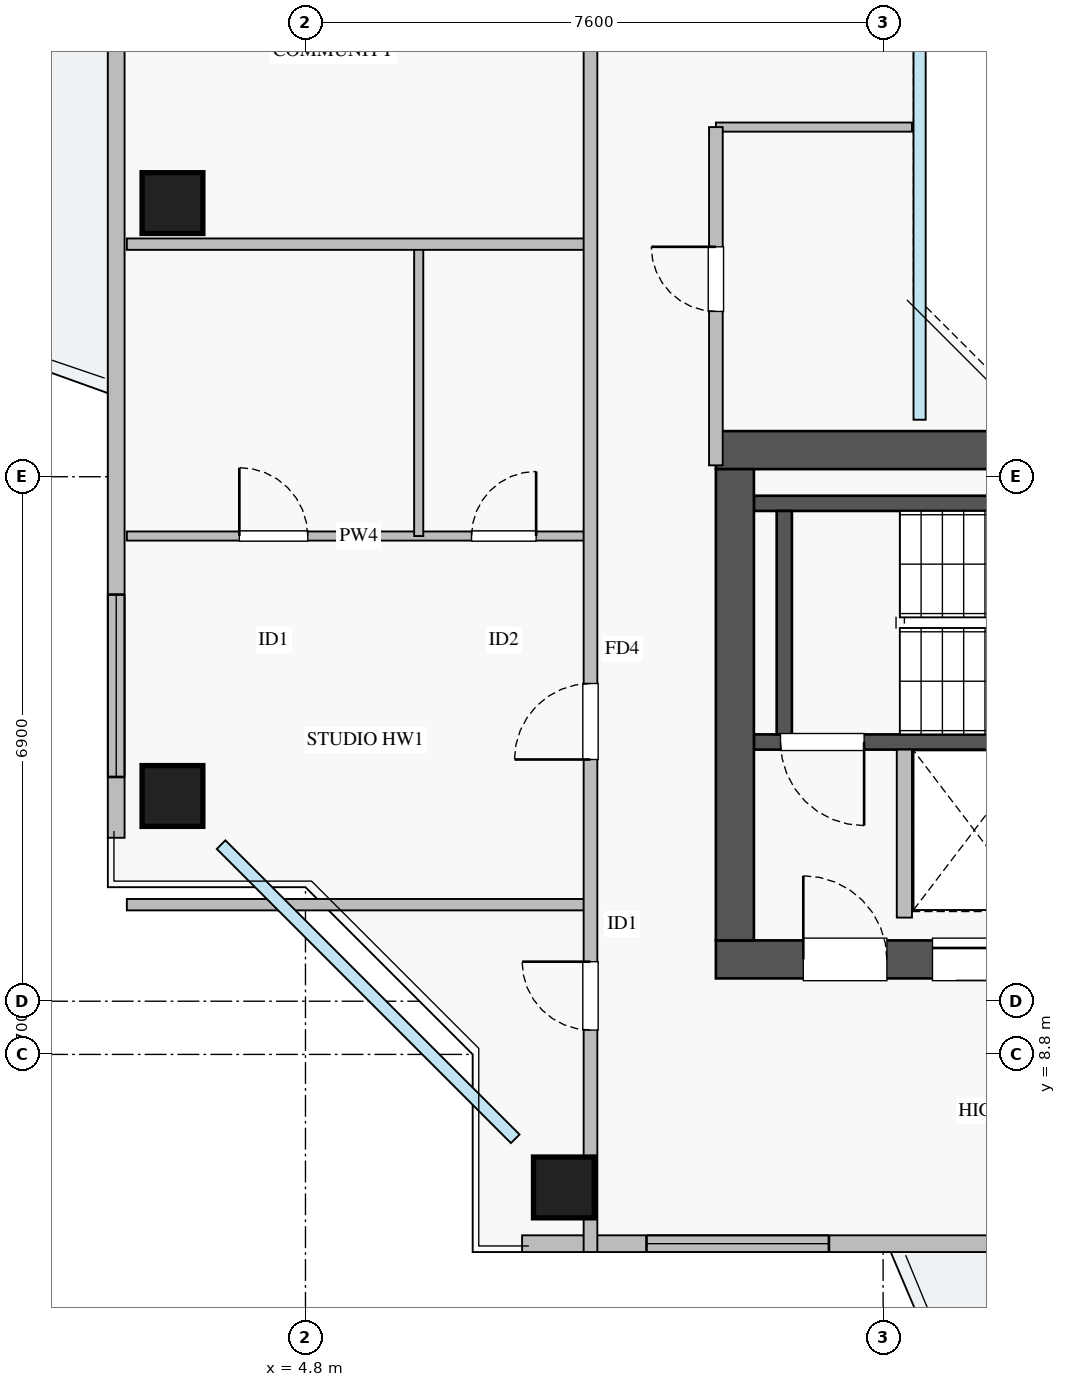
"""IFC4 building model, lengths in metres.
Left out: names, types, materials, properties, quantities, classifications, styles, units other than length and angle.
Written with IfcOpenShell. Run it as: python <this file> out.ifc"""

import sys

from ifc_helpers import new_model, si_unit, direction, frame, frame_2d, origin, origin_2d, place, context, subcontext, project, spatial, rectangle, extrude, source, transform, mapped, element, fill, save


model = new_model("IFC4")
c1 = context("Model", 3, precision=1e-05, world=origin(), true_north=direction((0.0, 1.0)))
c2 = subcontext(c1, "Body", "Model", "MODEL_VIEW")
j1 = project(units=[si_unit("LENGTHUNIT", "METRE"), si_unit("PLANEANGLEUNIT", "RADIAN")], contexts=[c1])
p1 = place(None, origin())
s1 = spatial("IfcSite", under=j1, at=p1, CompositionType="ELEMENT")
p2 = place(p1, origin())
s2 = spatial("IfcBuilding", under=s1, at=p2, CompositionType="ELEMENT")
p3 = place(p2, frame((0.0, 0.0, 206.75)))
s3 = spatial("IfcBuildingStorey", under=s2, at=p3, CompositionType="ELEMENT", Elevation=206.75)
p4 = place(p3, frame((12.68, 12.8, 0.0), z_axis=(0.0, 0.0, 1.0), x_axis=(1.0, 0.0, 0.0)))
e1 = element("IfcWall", 1, at=p4, inside=s3, PredefinedType="SHEAR", context=c2, shape_type="SweptSolid", body=[
    extrude(rectangle(XDim=1.94, YDim=0.18, at=frame_2d((0.97, 0.0))), origin(), (0.0, 0.0, 1.0), 3.07),
])
p5 = place(p3, frame((10.7, 12.91, 0.0), z_axis=(0.0, 0.0, 1.0), x_axis=(1.0, 0.0, 0.0)))
e2 = element("IfcWall", 2, at=p5, inside=s3, PredefinedType="SHEAR", context=c2, shape_type="SweptSolid", body=[
    extrude(rectangle(XDim=7.45, YDim=0.2, at=frame_2d((3.725, 0.0))), origin(), (0.0, 0.0, 1.0), 3.25),
])
p6 = place(p5, frame((0.35, 0.0, 0.0)))
e3 = element("IfcOpeningElement", 3, at=p6, cuts=e2, PredefinedType="OPENING", context=c2, shape_type="SweptSolid", body=[
    extrude(rectangle(XDim=1.1, YDim=2.05, at=frame_2d((0.55, 1.025))), frame((0.0, 0.11, 0.0), z_axis=(0.0, -1.0, 0.0), x_axis=(1.0, 0.0, 0.0)), (0.0, 0.0, 1.0), 0.22),
])
p7 = place(p3, frame((10.7, 16.05, 0.0), z_axis=(0.0, 0.0, 1.0), x_axis=(1.0, 0.0, 0.0)))
e4 = element("IfcWall", 4, at=p7, inside=s3, PredefinedType="SHEAR", context=c2, shape_type="SweptSolid", body=[
    extrude(rectangle(XDim=7.45, YDim=0.2, at=frame_2d((3.725, 0.0))), origin(), (0.0, 0.0, 1.0), 3.25),
])
p8 = place(p3, frame((11.1, 13.01, 0.0), z_axis=(0.0, 0.0, 1.0), x_axis=(0.0, 1.0, 0.0)))
e5 = element("IfcWall", 5, at=p8, inside=s3, PredefinedType="SHEAR", context=c2, shape_type="SweptSolid", body=[
    extrude(rectangle(XDim=2.94, YDim=0.2, at=frame_2d((1.47, 0.0))), origin(), (0.0, 0.0, 1.0), 3.25),
])
p9 = place(p3, frame((10.2, 10.05, 0.0), z_axis=(0.0, 0.0, 1.0), x_axis=(1.0, 0.0, 0.0)))
e6 = element("IfcWall", 6, at=p9, inside=s3, PredefinedType="SHEAR", context=c2, shape_type="SweptSolid", body=[
    extrude(rectangle(XDim=17.6, YDim=0.5, at=frame_2d((8.8, 0.0))), origin(), (0.0, 0.0, 1.0), 3.25),
])
p10 = place(p9, frame((1.15, 0.0, 0.0)))
e7 = element("IfcOpeningElement", 7, at=p10, cuts=e6, PredefinedType="OPENING", context=c2, shape_type="SweptSolid", body=[
    extrude(rectangle(XDim=1.1, YDim=2.05, at=frame_2d((0.55, 1.025))), frame((0.0, 0.26, 0.0), z_axis=(0.0, -1.0, 0.0), x_axis=(1.0, 0.0, 0.0)), (0.0, 0.0, 1.0), 0.52),
])
p11 = place(p9, frame((8.3, 0.0, 0.0)))
e8 = element("IfcOpeningElement", 8, at=p11, cuts=e6, PredefinedType="OPENING", context=c2, shape_type="SweptSolid", body=[
    extrude(rectangle(XDim=1.1, YDim=2.05, at=frame_2d((0.55, 1.025))), frame((0.0, 0.26, 0.0), z_axis=(0.0, -1.0, 0.0), x_axis=(1.0, 0.0, 0.0)), (0.0, 0.0, 1.0), 0.52),
])
p12 = place(p9, frame((2.85, 0.0, 0.0)))
e9 = element("IfcOpeningElement", 9, at=p12, cuts=e6, PredefinedType="OPENING", context=c2, shape_type="SweptSolid", body=[
    extrude(rectangle(XDim=1.1, YDim=2.05, at=frame_2d((0.55, 1.025))), frame((0.0, 0.26, 0.0), z_axis=(0.0, -1.0, 0.0), x_axis=(1.0, 0.0, 0.0)), (0.0, 0.0, 1.0), 0.52),
])
p13 = place(p9, frame((5.8, 0.0, 0.0)))
e10 = element("IfcOpeningElement", 10, at=p13, cuts=e6, PredefinedType="OPENING", context=c2, shape_type="SweptSolid", body=[
    extrude(rectangle(XDim=1.0, YDim=2.05, at=frame_2d((0.5, 1.025))), frame((0.0, 0.26, 0.0), z_axis=(0.0, -1.0, 0.0), x_axis=(1.0, 0.0, 0.0)), (0.0, 0.0, 1.0), 0.52),
])
p14 = place(p9, frame((14.74, 0.0, 0.0)))
e11 = element("IfcOpeningElement", 11, at=p14, cuts=e6, PredefinedType="OPENING", context=c2, shape_type="SweptSolid", body=[
    extrude(rectangle(XDim=1.0, YDim=2.05, at=frame_2d((0.5, 1.025))), frame((0.0, 0.26, 0.0), z_axis=(0.0, -1.0, 0.0), x_axis=(1.0, 0.0, 0.0)), (0.0, 0.0, 1.0), 0.52),
])
p15 = place(p9, frame((11.67, 0.0, 0.0)))
e12 = element("IfcOpeningElement", 12, at=p15, cuts=e6, PredefinedType="OPENING", context=c2, shape_type="SweptSolid", body=[
    extrude(rectangle(XDim=1.0, YDim=2.05, at=frame_2d((0.5, 1.025))), frame((0.0, 0.26, 0.0), z_axis=(0.0, -1.0, 0.0), x_axis=(1.0, 0.0, 0.0)), (0.0, 0.0, 1.0), 0.52),
])
p16 = place(p3, frame((10.2, 16.75, 0.0), z_axis=(0.0, 0.0, 1.0), x_axis=(1.0, 0.0, 0.0)))
e13 = element("IfcWall", 13, at=p16, inside=s3, PredefinedType="SHEAR", context=c2, shape_type="SweptSolid", body=[
    extrude(rectangle(XDim=17.6, YDim=0.5, at=frame_2d((8.8, 0.0))), origin(), (0.0, 0.0, 1.0), 3.25),
])
p17 = place(p3, frame((10.45, 10.3, 0.0), z_axis=(0.0, 0.0, 1.0), x_axis=(0.0, 1.0, 0.0)))
e14 = element("IfcWall", 14, at=p17, inside=s3, PredefinedType="SHEAR", context=c2, shape_type="SweptSolid", body=[
    extrude(rectangle(XDim=6.2, YDim=0.5, at=frame_2d((3.1, 0.0))), origin(), (0.0, 0.0, 1.0), 3.25),
])
m1 = source(origin(), c2, "Body", "SweptSolid", [
    extrude(rectangle(XDim=0.8, YDim=0.8, at=origin_2d()), origin(), (0.0, 0.0, 1.0), 3.25),
])
for number, where, z_axis, x_axis in (
    (15, (8.2, 7.05, 0.0), (0.0, 0.0, 1.0), (1.0, 0.0, 0.0)),
    (16, (3.05, 20.0, 0.0), (0.0, 0.0, 1.0), (1.0, 0.0, 0.0)),
    (17, (3.05, 12.2, 0.0), (0.0, 0.0, 1.0), (1.0, 0.0, 0.0)),
):
    element("IfcColumn", number, at=place(p3, frame(where, z_axis=z_axis, x_axis=x_axis)), inside=s3, PredefinedType="COLUMN", context=c2, shape_type="MappedRepresentation", body=[
        mapped(m1, transform((0.0, 0.0, 0.0), x_axis=(1.0, 0.0, 0.0), y_axis=(0.0, 1.0, 0.0), z_axis=(0.0, 0.0, 1.0), scale=1.0)),
    ])
p18 = place(p3, frame((7.65, 6.31, 0.0), z_axis=(0.0, 0.0, 1.0), x_axis=(1.0, 0.0, 0.0)))
e18 = element("IfcWall", 18, at=p18, inside=s3, PredefinedType="STANDARD", context=c2, shape_type="SweptSolid", body=[
    extrude(rectangle(XDim=22.7, YDim=0.22, at=frame_2d((11.35, 0.0))), origin(), (0.0, 0.0, 1.0), 2.61),
])
p19 = place(p18, frame((12.2, 0.0, 0.0)))
e19 = element("IfcOpeningElement", 19, at=p19, cuts=e18, PredefinedType="OPENING", context=c2, shape_type="SweptSolid", body=[
    extrude(rectangle(XDim=1.2, YDim=2.1, at=frame_2d((0.6, 1.05))), frame((0.0, 0.12, 0.0), z_axis=(0.0, -1.0, 0.0), x_axis=(1.0, 0.0, 0.0)), (0.0, 0.0, 1.0), 0.24),
])
p20 = place(p18, frame((1.637, 0.0, 0.9)))
e20 = element("IfcOpeningElement", 20, at=p20, cuts=e18, PredefinedType="OPENING", context=c2, shape_type="SweptSolid", body=[
    extrude(rectangle(XDim=2.4, YDim=1.48, at=frame_2d((1.2, 0.74))), frame((0.0, 0.12, 0.0), z_axis=(0.0, -1.0, 0.0), x_axis=(1.0, 0.0, 0.0)), (0.0, 0.0, 1.0), 0.24),
])
p21 = place(p18, frame((7.612, 0.0, 0.9)))
e21 = element("IfcOpeningElement", 21, at=p21, cuts=e18, PredefinedType="OPENING", context=c2, shape_type="SweptSolid", body=[
    extrude(rectangle(XDim=1.8, YDim=1.45, at=frame_2d((0.9, 0.725))), frame((0.0, 0.12, 0.0), z_axis=(0.0, -1.0, 0.0), x_axis=(1.0, 0.0, 0.0)), (0.0, 0.0, 1.0), 0.24),
])
p22 = place(p18, frame((19.788, 0.0, 0.9)))
e22 = element("IfcOpeningElement", 22, at=p22, cuts=e18, PredefinedType="OPENING", context=c2, shape_type="SweptSolid", body=[
    extrude(rectangle(XDim=2.1, YDim=1.5, at=frame_2d((1.05, 0.75))), frame((0.0, 0.12, 0.0), z_axis=(0.0, -1.0, 0.0), x_axis=(1.0, 0.0, 0.0)), (0.0, 0.0, 1.0), 0.24),
])
p23 = place(p3, frame((2.31, 11.65, 0.0), z_axis=(0.0, 0.0, 1.0), x_axis=(0.0, 1.0, 0.0)))
e23 = element("IfcWall", 23, at=p23, inside=s3, PredefinedType="STANDARD", context=c2, shape_type="SweptSolid", body=[
    extrude(rectangle(XDim=22.7, YDim=0.22, at=frame_2d((11.35, 0.0))), origin(), (0.0, 0.0, 1.0), 2.61),
])
p24 = place(p23, frame((12.2, 0.0, 0.0)))
e24 = element("IfcOpeningElement", 24, at=p24, cuts=e23, PredefinedType="OPENING", context=c2, shape_type="SweptSolid", body=[
    extrude(rectangle(XDim=1.2, YDim=2.1, at=frame_2d((0.6, 1.05))), frame((0.0, 0.12, 0.0), z_axis=(0.0, -1.0, 0.0), x_axis=(1.0, 0.0, 0.0)), (0.0, 0.0, 1.0), 0.24),
])
p25 = place(p23, frame((0.8, 0.0, 0.9)))
e25 = element("IfcOpeningElement", 25, at=p25, cuts=e23, PredefinedType="OPENING", context=c2, shape_type="SweptSolid", body=[
    extrude(rectangle(XDim=2.4, YDim=1.5, at=frame_2d((1.2, 0.75))), frame((0.0, 0.12, 0.0), z_axis=(0.0, -1.0, 0.0), x_axis=(1.0, 0.0, 0.0)), (0.0, 0.0, 1.0), 0.24),
])
p26 = place(p23, frame((20.08, 0.0, 0.9)))
e26 = element("IfcOpeningElement", 26, at=p26, cuts=e23, PredefinedType="OPENING", context=c2, shape_type="SweptSolid", body=[
    extrude(rectangle(XDim=2.1, YDim=1.5, at=frame_2d((1.05, 0.75))), frame((0.0, 0.12, 0.0), z_axis=(0.0, -1.0, 0.0), x_axis=(1.0, 0.0, 0.0)), (0.0, 0.0, 1.0), 0.24),
])
p27 = place(p23, frame((16.258, 0.0, 0.9)))
e27 = element("IfcOpeningElement", 27, at=p27, cuts=e23, PredefinedType="OPENING", context=c2, shape_type="SweptSolid", body=[
    extrude(rectangle(XDim=2.4, YDim=1.5, at=frame_2d((1.2, 0.75))), frame((0.0, 0.12, 0.0), z_axis=(0.0, -1.0, 0.0), x_axis=(1.0, 0.0, 0.0)), (0.0, 0.0, 1.0), 0.24),
])
p28 = place(p3, frame((12.68, 10.6, 0.0), z_axis=(0.0, 0.0, 1.0), x_axis=(0.0, 1.0, 0.0)))
e28 = element("IfcWall", 28, at=p28, inside=s3, PredefinedType="PARTITIONING", context=c2, shape_type="SweptSolid", body=[
    extrude(rectangle(XDim=2.21, YDim=0.2, at=frame_2d((1.105, 0.0))), origin(), (0.0, 0.0, 1.0), 3.07),
])
p29 = place(p3, frame((2.45, 10.77, 0.0), z_axis=(0.0, 0.0, 1.0), x_axis=(1.0, 0.0, 0.0)))
e29 = element("IfcWall", 29, at=p29, inside=s3, PredefinedType="PARTITIONING", context=c2, shape_type="SweptSolid", body=[
    extrude(rectangle(XDim=6.1, YDim=0.15, at=frame_2d((3.05, 0.0))), origin(), (0.0, 0.0, 1.0), 3.07),
])
p30 = place(p3, frame((2.45, 15.62, 0.0), z_axis=(0.0, 0.0, 1.0), x_axis=(1.0, 0.0, 0.0)))
e30 = element("IfcWall", 30, at=p30, inside=s3, PredefinedType="PLUMBINGWALL", context=c2, shape_type="SweptSolid", body=[
    extrude(rectangle(XDim=6.1, YDim=0.12, at=frame_2d((3.05, 0.0))), origin(), (0.0, 0.0, 1.0), 3.07),
])
p31 = place(p30, frame((1.48, 0.0, 0.0)))
e31 = element("IfcOpeningElement", 31, at=p31, cuts=e30, PredefinedType="OPENING", context=c2, shape_type="SweptSolid", body=[
    extrude(rectangle(XDim=0.9, YDim=2.05, at=frame_2d((0.45, 1.025))), frame((0.0, 0.07, 0.0), z_axis=(0.0, -1.0, 0.0), x_axis=(1.0, 0.0, 0.0)), (0.0, 0.0, 1.0), 0.14),
])
p32 = place(p30, frame((4.535, 0.0, 0.0)))
e32 = element("IfcOpeningElement", 32, at=p32, cuts=e30, PredefinedType="OPENING", context=c2, shape_type="SweptSolid", body=[
    extrude(rectangle(XDim=0.85, YDim=2.05, at=frame_2d((0.425, 1.025))), frame((0.0, 0.07, 0.0), z_axis=(0.0, -1.0, 0.0), x_axis=(1.0, 0.0, 0.0)), (0.0, 0.0, 1.0), 0.14),
])
p33 = place(p3, frame((6.29, 15.62, 0.0), z_axis=(0.0, 0.0, 1.0), x_axis=(0.0, 1.0, 0.0)))
e33 = element("IfcWall", 33, at=p33, inside=s3, PredefinedType="PLUMBINGWALL", context=c2, shape_type="SweptSolid", body=[
    extrude(rectangle(XDim=3.84, YDim=0.12, at=frame_2d((1.92, 0.0))), origin(), (0.0, 0.0, 1.0), 3.07),
])
p34 = place(p3, frame((2.45, 19.46, 0.0), z_axis=(0.0, 0.0, 1.0), x_axis=(1.0, 0.0, 0.0)))
e34 = element("IfcWall", 34, at=p34, inside=s3, PredefinedType="PARTITIONING", context=c2, shape_type="SweptSolid", body=[
    extrude(rectangle(XDim=6.1, YDim=0.15, at=frame_2d((3.05, 0.0))), origin(), (0.0, 0.0, 1.0), 3.07),
])
p35 = place(p3, frame((8.55, 6.2, 0.0), z_axis=(0.0, 0.0, 1.0), x_axis=(0.0, 1.0, 0.0)))
e35 = element("IfcWall", 35, at=p35, inside=s3, PredefinedType="PARTITIONING", context=c2, shape_type="SweptSolid", body=[
    extrude(rectangle(XDim=33.6, YDim=0.18, at=frame_2d((16.8, 0.0))), origin(), (0.0, 0.0, 1.0), 3.07),
])
p36 = place(p35, frame((29.605, 0.0, 0.0)))
e36 = element("IfcOpeningElement", 36, at=p36, cuts=e35, PredefinedType="OPENING", context=c2, shape_type="SweptSolid", body=[
    extrude(rectangle(XDim=0.9, YDim=2.05, at=frame_2d((0.45, 1.025))), frame((0.0, 0.1, 0.0), z_axis=(0.0, -1.0, 0.0), x_axis=(1.0, 0.0, 0.0)), (0.0, 0.0, 1.0), 0.2),
])
p37 = place(p35, frame((2.92, 0.0, 0.0)))
e37 = element("IfcOpeningElement", 37, at=p37, cuts=e35, PredefinedType="OPENING", context=c2, shape_type="SweptSolid", body=[
    extrude(rectangle(XDim=0.9, YDim=2.05, at=frame_2d((0.45, 1.025))), frame((0.0, 0.1, 0.0), z_axis=(0.0, -1.0, 0.0), x_axis=(1.0, 0.0, 0.0)), (0.0, 0.0, 1.0), 0.2),
])
p38 = place(p35, frame((6.48, 0.0, 0.0)))
e38 = element("IfcOpeningElement", 38, at=p38, cuts=e35, PredefinedType="OPENING", context=c2, shape_type="SweptSolid", body=[
    extrude(rectangle(XDim=1.0, YDim=2.05, at=frame_2d((0.5, 1.025))), frame((0.0, 0.1, 0.0), z_axis=(0.0, -1.0, 0.0), x_axis=(1.0, 0.0, 0.0)), (0.0, 0.0, 1.0), 0.2),
])
p39 = place(p35, frame((16.51, 0.0, 0.0)))
e39 = element("IfcOpeningElement", 39, at=p39, cuts=e35, PredefinedType="OPENING", context=c2, shape_type="SweptSolid", body=[
    extrude(rectangle(XDim=1.0, YDim=2.05, at=frame_2d((0.5, 1.025))), frame((0.0, 0.1, 0.0), z_axis=(0.0, -1.0, 0.0), x_axis=(1.0, 0.0, 0.0)), (0.0, 0.0, 1.0), 0.2),
])
p40 = place(p35, frame((22.21, 0.0, 0.0)))
e40 = element("IfcOpeningElement", 40, at=p40, cuts=e35, PredefinedType="OPENING", context=c2, shape_type="SweptSolid", body=[
    extrude(rectangle(XDim=1.0, YDim=2.05, at=frame_2d((0.5, 1.025))), frame((0.0, 0.1, 0.0), z_axis=(0.0, -1.0, 0.0), x_axis=(1.0, 0.0, 0.0)), (0.0, 0.0, 1.0), 0.2),
])
p41 = place(p3, frame((10.2, 21.0, 0.0), z_axis=(0.0, 0.0, 1.0), x_axis=(1.0, 0.0, 0.0)))
e41 = element("IfcWall", 41, at=p41, inside=s3, PredefinedType="PLUMBINGWALL", context=c2, shape_type="SweptSolid", body=[
    extrude(rectangle(XDim=2.58, YDim=0.12, at=frame_2d((1.29, 0.0))), origin(), (0.0, 0.0, 1.0), 3.07),
])
p42 = place(p3, frame((10.2, 16.55, 0.0), z_axis=(0.0, 0.0, 1.0), x_axis=(0.0, 1.0, 0.0)))
e42 = element("IfcWall", 42, at=p42, inside=s3, PredefinedType="PARTITIONING", context=c2, shape_type="SweptSolid", body=[
    extrude(rectangle(XDim=4.45, YDim=0.18, at=frame_2d((2.225, 0.0))), origin(), (0.0, 0.0, 1.0), 3.07),
])
p43 = place(p42, frame((2.025, 0.0, 0.0)))
e43 = element("IfcOpeningElement", 43, at=p43, cuts=e42, PredefinedType="OPENING", context=c2, shape_type="SweptSolid", body=[
    extrude(rectangle(XDim=0.85, YDim=2.05, at=frame_2d((0.425, 1.025))), frame((0.0, 0.1, 0.0), z_axis=(0.0, -1.0, 0.0), x_axis=(1.0, 0.0, 0.0)), (0.0, 0.0, 1.0), 0.2),
])
m2 = source(origin(), c2, "Body", "SweptSolid", [
    extrude(rectangle(XDim=2.4, YDim=1.48, at=frame_2d((1.2, 0.74))), frame((0.0, 0.03, 0.0), z_axis=(0.0, -1.0, 0.0), x_axis=(1.0, 0.0, 0.0)), (0.0, 0.0, 1.0), 0.06),
])
p44 = place(p20, origin())
e44 = element("IfcWindow", 44, at=p44, inside=s3, PartitioningType="TRIPLE_PANEL_VERTICAL", PredefinedType="WINDOW", context=c2, shape_type="MappedRepresentation", body=[
    mapped(m2, transform((0.0, 0.0, 0.0), x_axis=(1.0, 0.0, 0.0), y_axis=(0.0, 1.0, 0.0), z_axis=(0.0, 0.0, 1.0), scale=1.0)),
])
fill(e20, e44)
m3 = source(origin(), c2, "Body", "SweptSolid", [
    extrude(rectangle(XDim=2.4, YDim=1.5, at=frame_2d((1.2, 0.75))), frame((0.0, 0.03, 0.0), z_axis=(0.0, -1.0, 0.0), x_axis=(1.0, 0.0, 0.0)), (0.0, 0.0, 1.0), 0.06),
])
p45 = place(p25, origin())
e45 = element("IfcWindow", 45, at=p45, inside=s3, PartitioningType="TRIPLE_PANEL_VERTICAL", PredefinedType="WINDOW", context=c2, shape_type="MappedRepresentation", body=[
    mapped(m3, transform((0.0, 0.0, 0.0), x_axis=(1.0, 0.0, 0.0), y_axis=(0.0, 1.0, 0.0), z_axis=(0.0, 0.0, 1.0), scale=1.0)),
])
fill(e25, e45)
m4 = source(origin(), c2, "Body", "SweptSolid", [
    extrude(rectangle(XDim=1.1, YDim=2.05, at=frame_2d((0.55, 1.025))), frame((0.0, 0.025, 0.0), z_axis=(0.0, -1.0, 0.0), x_axis=(1.0, 0.0, 0.0)), (0.0, 0.0, 1.0), 0.05),
])
p46 = place(p10, origin())
e46 = element("IfcDoor", 46, at=p46, inside=s3, OperationType="SINGLE_SWING_LEFT", PredefinedType="DOOR", context=c2, shape_type="MappedRepresentation", body=[
    mapped(m4, transform((0.0, 0.0, 0.0), x_axis=(1.0, 0.0, 0.0), y_axis=(0.0, 1.0, 0.0), z_axis=(0.0, 0.0, 1.0), scale=1.0)),
])
fill(e7, e46)
p47 = place(p6, frame((1.1, 0.0, 0.0), z_axis=(0.0, 0.0, 1.0), x_axis=(-1.0, 0.0, 0.0)))
e47 = element("IfcDoor", 47, at=p47, inside=s3, OperationType="SINGLE_SWING_RIGHT", PredefinedType="DOOR", context=c2, shape_type="MappedRepresentation", body=[
    mapped(m4, transform((0.0, 0.0, 0.0), x_axis=(1.0, 0.0, 0.0), y_axis=(0.0, 1.0, 0.0), z_axis=(0.0, 0.0, 1.0), scale=1.0)),
])
fill(e3, e47)
p48 = place(p12, origin())
e48 = element("IfcDoor", 48, at=p48, inside=s3, OperationType="SLIDING_TO_RIGHT", PredefinedType="DOOR", context=c2, shape_type="MappedRepresentation", body=[
    mapped(m4, transform((0.0, 0.0, 0.0), x_axis=(1.0, 0.0, 0.0), y_axis=(0.0, 1.0, 0.0), z_axis=(0.0, 0.0, 1.0), scale=1.0)),
])
fill(e9, e48)
m5 = source(origin(), c2, "Body", "SweptSolid", [
    extrude(rectangle(XDim=0.9, YDim=2.05, at=frame_2d((0.45, 1.025))), frame((0.0, 0.025, 0.0), z_axis=(0.0, -1.0, 0.0), x_axis=(1.0, 0.0, 0.0)), (0.0, 0.0, 1.0), 0.05),
])
p49 = place(p31, origin())
e49 = element("IfcDoor", 49, at=p49, inside=s3, OperationType="SINGLE_SWING_LEFT", PredefinedType="DOOR", context=c2, shape_type="MappedRepresentation", body=[
    mapped(m5, transform((0.0, 0.0, 0.0), x_axis=(1.0, 0.0, 0.0), y_axis=(0.0, 1.0, 0.0), z_axis=(0.0, 0.0, 1.0), scale=1.0)),
])
fill(e31, e49)
m6 = source(origin(), c2, "Body", "SweptSolid", [
    extrude(rectangle(XDim=0.85, YDim=2.05, at=frame_2d((0.425, 1.025))), frame((0.0, 0.025, 0.0), z_axis=(0.0, -1.0, 0.0), x_axis=(1.0, 0.0, 0.0)), (0.0, 0.0, 1.0), 0.05),
])
p50 = place(p32, origin())
e50 = element("IfcDoor", 50, at=p50, inside=s3, OperationType="SINGLE_SWING_RIGHT", PredefinedType="DOOR", context=c2, shape_type="MappedRepresentation", body=[
    mapped(m6, transform((0.0, 0.0, 0.0), x_axis=(1.0, 0.0, 0.0), y_axis=(0.0, 1.0, 0.0), z_axis=(0.0, 0.0, 1.0), scale=1.0)),
])
fill(e32, e50)
p51 = place(p37, origin())
e51 = element("IfcDoor", 51, at=p51, inside=s3, OperationType="SINGLE_SWING_RIGHT", PredefinedType="DOOR", context=c2, shape_type="MappedRepresentation", body=[
    mapped(m5, transform((0.0, 0.0, 0.0), x_axis=(1.0, 0.0, 0.0), y_axis=(0.0, 1.0, 0.0), z_axis=(0.0, 0.0, 1.0), scale=1.0)),
])
fill(e37, e51)
m7 = source(origin(), c2, "Body", "SweptSolid", [
    extrude(rectangle(XDim=1.0, YDim=2.05, at=frame_2d((0.5, 1.025))), frame((0.0, 0.025, 0.0), z_axis=(0.0, -1.0, 0.0), x_axis=(1.0, 0.0, 0.0)), (0.0, 0.0, 1.0), 0.05),
])
p52 = place(p38, origin())
e52 = element("IfcDoor", 52, at=p52, inside=s3, OperationType="SINGLE_SWING_LEFT", PredefinedType="DOOR", context=c2, shape_type="MappedRepresentation", body=[
    mapped(m7, transform((0.0, 0.0, 0.0), x_axis=(1.0, 0.0, 0.0), y_axis=(0.0, 1.0, 0.0), z_axis=(0.0, 0.0, 1.0), scale=1.0)),
])
fill(e38, e52)
p53 = place(p43, origin())
e53 = element("IfcDoor", 53, at=p53, inside=s3, OperationType="SINGLE_SWING_RIGHT", PredefinedType="DOOR", context=c2, shape_type="MappedRepresentation", body=[
    mapped(m6, transform((0.0, 0.0, 0.0), x_axis=(1.0, 0.0, 0.0), y_axis=(0.0, 1.0, 0.0), z_axis=(0.0, 0.0, 1.0), scale=1.0)),
])
fill(e43, e53)
save(model, sys.argv[1])
